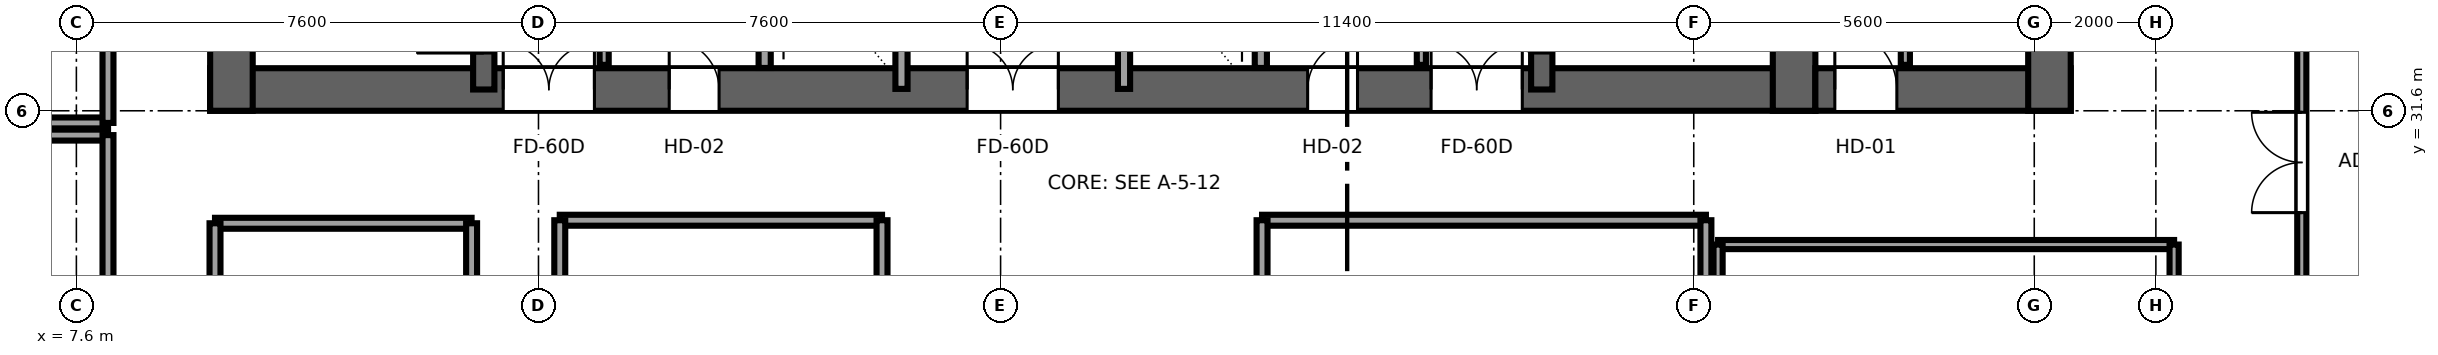
"""IFC4 building model, lengths in metres.
Left out: names, types, materials, properties, quantities, classifications, styles, units other than length and angle.
Written with IfcOpenShell. Run it as: python <this file> out.ifc"""

import sys

from ifc_helpers import new_model, si_unit, direction, frame, frame_2d, origin, place, context, subcontext, project, spatial, rectangle, extrude, source, transform, mapped, element, fill, save


model = new_model("IFC4")
c1 = context("Model", 3, precision=1e-05, world=origin(), true_north=direction((0.0, 1.0)))
c2 = subcontext(c1, "Body", "Model", "MODEL_VIEW")
j1 = project(units=[si_unit("LENGTHUNIT", "METRE"), si_unit("PLANEANGLEUNIT", "RADIAN")], contexts=[c1])
p1 = place(None, origin())
s1 = spatial("IfcSite", under=j1, at=p1, CompositionType="ELEMENT")
p2 = place(p1, origin())
s2 = spatial("IfcBuilding", under=s1, at=p2, CompositionType="ELEMENT")
p3 = place(p2, frame((0.0, 0.0, 168.35)))
s3 = spatial("IfcBuildingStorey", under=s2, at=p3, CompositionType="ELEMENT", Elevation=168.35)
p4 = place(p3, frame((9.8, 31.95, 0.0), z_axis=(0.0, 0.0, 1.0), x_axis=(1.0, 0.0, 0.0)))
e1 = element("IfcWall", 1, at=p4, inside=s3, PredefinedType="SHEAR", context=c2, shape_type="SweptSolid", body=[
    extrude(rectangle(XDim=26.4, YDim=0.7, at=frame_2d((13.2, 0.0))), origin(), (0.0, 0.0, 1.0), 3.55),
])
p5 = place(p4, frame((6.32, 0.0, 0.0), z_axis=(0.0, 0.0, 1.0), x_axis=(-1.0, 0.0, 0.0)))
e2 = element("IfcOpeningElement", 2, at=p5, cuts=e1, PredefinedType="OPENING", context=c2, shape_type="SweptSolid", body=[
    extrude(rectangle(XDim=1.5, YDim=2.04, at=frame_2d((0.75, 1.02))), frame((0.0, 0.36, 0.0), z_axis=(0.0, -1.0, 0.0), x_axis=(1.0, 0.0, 0.0)), (0.0, 0.0, 1.0), 0.72),
])
p6 = place(p4, frame((13.95, 0.0, 0.0), z_axis=(0.0, 0.0, 1.0), x_axis=(-1.0, 0.0, 0.0)))
e3 = element("IfcOpeningElement", 3, at=p6, cuts=e1, PredefinedType="OPENING", context=c2, shape_type="SweptSolid", body=[
    extrude(rectangle(XDim=1.5, YDim=2.04, at=frame_2d((0.75, 1.02))), frame((0.0, 0.36, 0.0), z_axis=(0.0, -1.0, 0.0), x_axis=(1.0, 0.0, 0.0)), (0.0, 0.0, 1.0), 0.72),
])
p7 = place(p4, frame((21.58, 0.0, 0.0), z_axis=(0.0, 0.0, 1.0), x_axis=(-1.0, 0.0, 0.0)))
e4 = element("IfcOpeningElement", 4, at=p7, cuts=e1, PredefinedType="OPENING", context=c2, shape_type="SweptSolid", body=[
    extrude(rectangle(XDim=1.5, YDim=2.04, at=frame_2d((0.75, 1.02))), frame((0.0, 0.36, 0.0), z_axis=(0.0, -1.0, 0.0), x_axis=(1.0, 0.0, 0.0)), (0.0, 0.0, 1.0), 0.72),
])
p8 = place(p4, frame((8.37, 0.0, 0.0), z_axis=(0.0, 0.0, 1.0), x_axis=(-1.0, 0.0, 0.0)))
e5 = element("IfcOpeningElement", 5, at=p8, cuts=e1, PredefinedType="OPENING", context=c2, shape_type="SweptSolid", body=[
    extrude(rectangle(XDim=0.82, YDim=2.01, at=frame_2d((0.41, 1.005))), frame((0.0, 0.36, 0.0), z_axis=(0.0, -1.0, 0.0), x_axis=(1.0, 0.0, 0.0)), (0.0, 0.0, 1.0), 0.72),
])
p9 = place(p4, frame((18.87, 0.0, 0.0), z_axis=(0.0, 0.0, 1.0), x_axis=(-1.0, 0.0, 0.0)))
e6 = element("IfcOpeningElement", 6, at=p9, cuts=e1, PredefinedType="OPENING", context=c2, shape_type="SweptSolid", body=[
    extrude(rectangle(XDim=0.82, YDim=2.01, at=frame_2d((0.41, 1.005))), frame((0.0, 0.36, 0.0), z_axis=(0.0, -1.0, 0.0), x_axis=(1.0, 0.0, 0.0)), (0.0, 0.0, 1.0), 0.72),
])
for number, where, z_axis, x_axis in (
    (7, (10.15, 31.6, 0.0), (0.0, 0.0, 1.0), (0.0, 1.0, 0.0)),
    (8, (35.85, 31.6, 0.0), (0.0, 0.0, 1.0), (0.0, 1.0, 0.0)),
):
    element("IfcWall", number, at=place(p3, frame(where, z_axis=z_axis, x_axis=x_axis)), inside=s3, PredefinedType="SHEAR", context=c2, shape_type="SweptSolid", body=[
        extrude(rectangle(XDim=13.6, YDim=0.7, at=frame_2d((6.8, 0.0))), origin(), (0.0, 0.0, 1.0), 3.55),
    ])
p10 = place(p3, frame((14.3, 31.95, 0.0), z_axis=(0.0, 0.0, 1.0), x_axis=(0.0, 1.0, 0.0)))
e9 = element("IfcWall", 9, at=p10, inside=s3, PredefinedType="SHEAR", context=c2, shape_type="SweptSolid", body=[
    extrude(rectangle(XDim=12.9, YDim=0.35, at=frame_2d((6.45, 0.0))), origin(), (0.0, 0.0, 1.0), 3.55),
])
p11 = place(p10, frame((0.6, 0.0, 0.0)))
e10 = element("IfcOpeningElement", 10, at=p11, cuts=e9, PredefinedType="OPENING", context=c2, shape_type="SweptSolid", body=[
    extrude(rectangle(XDim=1.1, YDim=2.12, at=frame_2d((0.55, 1.06))), frame((0.0, 0.185, 0.0), z_axis=(0.0, -1.0, 0.0), x_axis=(1.0, 0.0, 0.0)), (0.0, 0.0, 1.0), 0.37),
])
p12 = place(p3, frame((31.7, 31.95, 0.0), z_axis=(0.0, 0.0, 1.0), x_axis=(0.0, 1.0, 0.0)))
e11 = element("IfcWall", 11, at=p12, inside=s3, PredefinedType="SHEAR", context=c2, shape_type="SweptSolid", body=[
    extrude(rectangle(XDim=12.9, YDim=0.35, at=frame_2d((6.45, 0.0))), origin(), (0.0, 0.0, 1.0), 3.55),
])
p13 = place(p12, frame((1.7, 0.0, 0.0), z_axis=(0.0, 0.0, 1.0), x_axis=(-1.0, 0.0, 0.0)))
e12 = element("IfcOpeningElement", 12, at=p13, cuts=e11, PredefinedType="OPENING", context=c2, shape_type="SweptSolid", body=[
    extrude(rectangle(XDim=1.1, YDim=2.12, at=frame_2d((0.55, 1.06))), frame((0.0, 0.185, 0.0), z_axis=(0.0, -1.0, 0.0), x_axis=(1.0, 0.0, 0.0)), (0.0, 0.0, 1.0), 0.37),
])
p14 = place(p3, frame((36.2, 31.95, 0.0), z_axis=(0.0, 0.0, 1.0), x_axis=(1.0, 0.0, 0.0)))
e13 = element("IfcWall", 13, at=p14, inside=s3, PredefinedType="SHEAR", context=c2, shape_type="SweptSolid", body=[
    extrude(rectangle(XDim=4.2, YDim=0.7, at=frame_2d((2.1, 0.0))), origin(), (0.0, 0.0, 1.0), 3.55),
])
p15 = place(p14, frame((1.34, 0.0, 0.0), z_axis=(0.0, 0.0, 1.0), x_axis=(-1.0, 0.0, 0.0)))
e14 = element("IfcOpeningElement", 14, at=p15, cuts=e13, PredefinedType="OPENING", context=c2, shape_type="SweptSolid", body=[
    extrude(rectangle(XDim=1.02, YDim=2.03, at=frame_2d((0.51, 1.015))), frame((0.0, 0.36, 0.0), z_axis=(0.0, -1.0, 0.0), x_axis=(1.0, 0.0, 0.0)), (0.0, 0.0, 1.0), 0.72),
])
p16 = place(p3, frame((40.05, 31.6, 0.0), z_axis=(0.0, 0.0, 1.0), x_axis=(0.0, 1.0, 0.0)))
e15 = element("IfcWall", 15, at=p16, inside=s3, PredefinedType="SHEAR", context=c2, shape_type="SweptSolid", body=[
    extrude(rectangle(XDim=13.6, YDim=0.7, at=frame_2d((6.8, 0.0))), origin(), (0.0, 0.0, 1.0), 3.55),
])
for number, where, z_axis, x_axis in (
    (16, (18.92, 32.304, 0.0), (0.0, 0.0, 1.0), (0.0, 1.0, 0.0)),
    (17, (27.08, 32.304, 0.0), (0.0, 0.0, 1.0), (0.0, 1.0, 0.0)),
):
    element("IfcWall", number, at=place(p3, frame(where, z_axis=z_axis, x_axis=x_axis)), inside=s3, PredefinedType="SOLIDWALL", context=c2, shape_type="SweptSolid", body=[
        extrude(rectangle(XDim=3.846, YDim=0.2, at=frame_2d((1.923, 0.0))), origin(), (0.0, 0.0, 1.0), 3.37),
    ])
p17 = place(p3, frame((21.17, 31.96, 0.0), z_axis=(0.0, 0.0, 1.0), x_axis=(0.0, 1.0, 0.0)))
e18 = element("IfcWall", 18, at=p17, inside=s3, PredefinedType="SOLIDWALL", context=c2, shape_type="SweptSolid", body=[
    extrude(rectangle(XDim=12.58, YDim=0.2, at=frame_2d((6.29, 0.0))), origin(), (0.0, 0.0, 1.0), 3.37),
])
p18 = place(p17, frame((5.74, 0.0, 0.0)))
e19 = element("IfcOpeningElement", 19, at=p18, cuts=e18, PredefinedType="OPENING", context=c2, shape_type="SweptSolid", body=[
    extrude(rectangle(XDim=1.1, YDim=2.12, at=frame_2d((0.55, 1.06))), frame((0.0, 0.11, 0.0), z_axis=(0.0, -1.0, 0.0), x_axis=(1.0, 0.0, 0.0)), (0.0, 0.0, 1.0), 0.22),
])
p19 = place(p17, frame((8.24, 0.0, 0.0)))
e20 = element("IfcOpeningElement", 20, at=p19, cuts=e18, PredefinedType="OPENING", context=c2, shape_type="SweptSolid", body=[
    extrude(rectangle(XDim=1.1, YDim=2.12, at=frame_2d((0.55, 1.06))), frame((0.0, 0.11, 0.0), z_axis=(0.0, -1.0, 0.0), x_axis=(1.0, 0.0, 0.0)), (0.0, 0.0, 1.0), 0.22),
])
p20 = place(p3, frame((24.83, 31.96, 0.0), z_axis=(0.0, 0.0, 1.0), x_axis=(0.0, 1.0, 0.0)))
e21 = element("IfcWall", 21, at=p20, inside=s3, PredefinedType="SOLIDWALL", context=c2, shape_type="SweptSolid", body=[
    extrude(rectangle(XDim=12.58, YDim=0.2, at=frame_2d((6.29, 0.0))), origin(), (0.0, 0.0, 1.0), 3.37),
])
p21 = place(p20, frame((5.74, 0.0, 0.0)))
e22 = element("IfcOpeningElement", 22, at=p21, cuts=e21, PredefinedType="OPENING", context=c2, shape_type="SweptSolid", body=[
    extrude(rectangle(XDim=1.1, YDim=2.12, at=frame_2d((0.55, 1.06))), frame((0.0, 0.11, 0.0), z_axis=(0.0, -1.0, 0.0), x_axis=(1.0, 0.0, 0.0)), (0.0, 0.0, 1.0), 0.22),
])
p22 = place(p20, frame((8.24, 0.0, 0.0)))
e23 = element("IfcOpeningElement", 23, at=p22, cuts=e21, PredefinedType="OPENING", context=c2, shape_type="SweptSolid", body=[
    extrude(rectangle(XDim=1.1, YDim=2.12, at=frame_2d((0.55, 1.06))), frame((0.0, 0.11, 0.0), z_axis=(0.0, -1.0, 0.0), x_axis=(1.0, 0.0, 0.0)), (0.0, 0.0, 1.0), 0.22),
])
for number, where, z_axis, x_axis in (
    (24, (16.28, 32.355, 0.0), (0.0, 0.0, 1.0), (0.0, 1.0, 0.0)),
    (25, (29.72, 32.355, 0.0), (0.0, 0.0, 1.0), (0.0, 1.0, 0.0)),
):
    element("IfcWall", number, at=place(p3, frame(where, z_axis=z_axis, x_axis=x_axis)), inside=s3, PredefinedType="PARTITIONING", context=c2, shape_type="SweptSolid", body=[
        extrude(rectangle(XDim=0.865, YDim=0.15, at=frame_2d((0.433, 0.0))), origin(), (0.0, 0.0, 1.0), 3.37),
    ])
p23 = place(p3, frame((37.68, 32.355, 0.0), z_axis=(0.0, 0.0, 1.0), x_axis=(0.0, 1.0, 0.0)))
e26 = element("IfcWall", 26, at=p23, inside=s3, PredefinedType="PARTITIONING", context=c2, shape_type="SweptSolid", body=[
    extrude(rectangle(XDim=7.845, YDim=0.15, at=frame_2d((3.922, 0.0))), origin(), (0.0, 0.0, 1.0), 3.37),
])
p24 = place(p23, frame((3.413, 0.0, 0.0)))
e27 = element("IfcOpeningElement", 27, at=p24, cuts=e26, PredefinedType="OPENING", context=c2, shape_type="SweptSolid", body=[
    extrude(rectangle(XDim=1.02, YDim=2.03, at=frame_2d((0.51, 1.015))), frame((0.0, 0.085, 0.0), z_axis=(0.0, -1.0, 0.0), x_axis=(1.0, 0.0, 0.0)), (0.0, 0.0, 1.0), 0.17),
])
p25 = place(p3, frame((3.005, 31.2, 0.0), z_axis=(0.0, 0.0, 1.0), x_axis=(1.0, 0.0, 0.0)))
e28 = element("IfcWall", 28, at=p25, inside=s3, PredefinedType="PARTITIONING", context=c2, shape_type="SweptSolid", body=[
    extrude(rectangle(XDim=5.115, YDim=0.18, at=frame_2d((2.558, 0.0))), origin(), (0.0, 0.0, 1.0), 3.37),
])
p26 = place(p3, frame((8.12, 23.1, 0.0), z_axis=(0.0, 0.0, 1.0), x_axis=(0.0, 1.0, 0.0)))
e29 = element("IfcWall", 29, at=p26, inside=s3, PredefinedType="PARTITIONING", context=c2, shape_type="SweptSolid", body=[
    extrude(rectangle(XDim=8.1, YDim=0.18, at=frame_2d((4.05, 0.0))), origin(), (0.0, 0.0, 1.0), 3.37),
])
p27 = place(p26, frame((3.225, 0.0, 0.0)))
e30 = element("IfcOpeningElement", 30, at=p27, cuts=e29, PredefinedType="OPENING", context=c2, shape_type="SweptSolid", body=[
    extrude(rectangle(XDim=1.65, YDim=2.15, at=frame_2d((0.825, 1.075))), frame((0.0, 0.1, 0.0), z_axis=(0.0, -1.0, 0.0), x_axis=(1.0, 0.0, 0.0)), (0.0, 0.0, 1.0), 0.2),
])
p28 = place(p3, frame((3.005, 31.4, 0.0), z_axis=(0.0, 0.0, 1.0), x_axis=(1.0, 0.0, 0.0)))
e31 = element("IfcWall", 31, at=p28, inside=s3, PredefinedType="PARTITIONING", context=c2, shape_type="SweptSolid", body=[
    extrude(rectangle(XDim=5.115, YDim=0.18, at=frame_2d((2.558, 0.0))), origin(), (0.0, 0.0, 1.0), 3.37),
])
p29 = place(p3, frame((8.12, 31.4, 0.0), z_axis=(0.0, 0.0, 1.0), x_axis=(0.0, 1.0, 0.0)))
e32 = element("IfcWall", 32, at=p29, inside=s3, PredefinedType="PARTITIONING", context=c2, shape_type="SweptSolid", body=[
    extrude(rectangle(XDim=6.8, YDim=0.18, at=frame_2d((3.4, 0.0))), origin(), (0.0, 0.0, 1.0), 3.37),
])
p30 = place(p29, frame((3.175, 0.0, 0.0)))
e33 = element("IfcOpeningElement", 33, at=p30, cuts=e32, PredefinedType="OPENING", context=c2, shape_type="SweptSolid", body=[
    extrude(rectangle(XDim=1.65, YDim=2.15, at=frame_2d((0.825, 1.075))), frame((0.0, 0.1, 0.0), z_axis=(0.0, -1.0, 0.0), x_axis=(1.0, 0.0, 0.0)), (0.0, 0.0, 1.0), 0.2),
])
p31 = place(p3, frame((44.2, 26.9, 0.0), z_axis=(0.0, 0.0, 1.0), x_axis=(0.0, 1.0, 0.0)))
e34 = element("IfcWall", 34, at=p31, inside=s3, PredefinedType="PARTITIONING", context=c2, shape_type="SweptSolid", body=[
    extrude(rectangle(XDim=7.7, YDim=0.15, at=frame_2d((3.85, 0.0))), origin(), (0.0, 0.0, 1.0), 3.37),
])
p32 = place(p31, frame((3.025, 0.0, 0.0)))
e35 = element("IfcOpeningElement", 35, at=p32, cuts=e34, PredefinedType="OPENING", context=c2, shape_type="SweptSolid", body=[
    extrude(rectangle(XDim=1.65, YDim=2.15, at=frame_2d((0.825, 1.075))), frame((0.0, 0.085, 0.0), z_axis=(0.0, -1.0, 0.0), x_axis=(1.0, 0.0, 0.0)), (0.0, 0.0, 1.0), 0.17),
])
p33 = place(p3, frame((9.88, 29.75, 0.0), z_axis=(0.0, 0.0, 1.0), x_axis=(1.0, 0.0, 0.0)))
e36 = element("IfcWall", 36, at=p33, inside=s3, PredefinedType="PARTITIONING", context=c2, shape_type="SweptSolid", body=[
    extrude(rectangle(XDim=4.22, YDim=0.18, at=frame_2d((2.11, 0.0))), origin(), (0.0, 0.0, 1.0), 3.37),
])
for number, where, z_axis, x_axis in (
    (37, (9.88, 23.1, 0.0), (0.0, 0.0, 1.0), (0.0, 1.0, 0.0)),
    (38, (14.1, 23.1, 0.0), (0.0, 0.0, 1.0), (0.0, 1.0, 0.0)),
):
    element("IfcWall", number, at=place(p3, frame(where, z_axis=z_axis, x_axis=x_axis)), inside=s3, PredefinedType="PARTITIONING", context=c2, shape_type="SweptSolid", body=[
        extrude(rectangle(XDim=6.65, YDim=0.18, at=frame_2d((3.325, 0.0))), origin(), (0.0, 0.0, 1.0), 3.37),
    ])
p34 = place(p3, frame((27.1, 29.8, 0.0), z_axis=(0.0, 0.0, 1.0), x_axis=(1.0, 0.0, 0.0)))
e39 = element("IfcWall", 39, at=p34, inside=s3, PredefinedType="PARTITIONING", context=c2, shape_type="SweptSolid", body=[
    extrude(rectangle(XDim=7.3, YDim=0.18, at=frame_2d((3.65, 0.0))), origin(), (0.0, 0.0, 1.0), 3.37),
])
for number, where, z_axis, x_axis in (
    (40, (27.1, 23.1, 0.0), (0.0, 0.0, 1.0), (0.0, 1.0, 0.0)),
    (41, (34.4, 23.1, 0.0), (0.0, 0.0, 1.0), (0.0, 1.0, 0.0)),
):
    element("IfcWall", number, at=place(p3, frame(where, z_axis=z_axis, x_axis=x_axis)), inside=s3, PredefinedType="PARTITIONING", context=c2, shape_type="SweptSolid", body=[
        extrude(rectangle(XDim=6.7, YDim=0.18, at=frame_2d((3.35, 0.0))), origin(), (0.0, 0.0, 1.0), 3.37),
    ])
p35 = place(p3, frame((15.55, 29.8, 0.0), z_axis=(0.0, 0.0, 1.0), x_axis=(1.0, 0.0, 0.0)))
e42 = element("IfcWall", 42, at=p35, inside=s3, PredefinedType="PARTITIONING", context=c2, shape_type="SweptSolid", body=[
    extrude(rectangle(XDim=5.3, YDim=0.18, at=frame_2d((2.65, 0.0))), origin(), (0.0, 0.0, 1.0), 3.37),
])
for number, where, z_axis, x_axis in (
    (43, (15.55, 23.1, 0.0), (0.0, 0.0, 1.0), (0.0, 1.0, 0.0)),
    (44, (20.85, 23.1, 0.0), (0.0, 0.0, 1.0), (0.0, 1.0, 0.0)),
):
    element("IfcWall", number, at=place(p3, frame(where, z_axis=z_axis, x_axis=x_axis)), inside=s3, PredefinedType="PARTITIONING", context=c2, shape_type="SweptSolid", body=[
        extrude(rectangle(XDim=6.7, YDim=0.18, at=frame_2d((3.35, 0.0))), origin(), (0.0, 0.0, 1.0), 3.37),
    ])
p36 = place(p3, frame((34.6, 29.4, 0.0), z_axis=(0.0, 0.0, 1.0), x_axis=(1.0, 0.0, 0.0)))
e45 = element("IfcWall", 45, at=p36, inside=s3, PredefinedType="PARTITIONING", context=c2, shape_type="SweptSolid", body=[
    extrude(rectangle(XDim=7.5, YDim=0.15, at=frame_2d((3.75, 0.0))), origin(), (0.0, 0.0, 1.0), 3.37),
])
p37 = place(p3, frame((34.6, 23.1, 0.0), z_axis=(0.0, 0.0, 1.0), x_axis=(0.0, 1.0, 0.0)))
e46 = element("IfcWall", 46, at=p37, inside=s3, PredefinedType="PARTITIONING", context=c2, shape_type="SweptSolid", body=[
    extrude(rectangle(XDim=6.3, YDim=0.15, at=frame_2d((3.15, 0.0))), origin(), (0.0, 0.0, 1.0), 3.37),
])
p38 = place(p3, frame((42.1, 23.1, 0.0), z_axis=(0.0, 0.0, 1.0), x_axis=(0.0, 1.0, 0.0)))
e47 = element("IfcWall", 47, at=p38, inside=s3, PredefinedType="PARTITIONING", context=c2, shape_type="SweptSolid", body=[
    extrude(rectangle(XDim=6.3, YDim=0.15, at=frame_2d((3.15, 0.0))), origin(), (0.0, 0.0, 1.0), 2.16),
])
m1 = source(origin(), c2, "Body", "SweptSolid", [
    extrude(rectangle(XDim=1.1, YDim=2.12, at=frame_2d((0.55, 1.06))), frame((0.0, 0.025, 0.0), z_axis=(0.0, -1.0, 0.0), x_axis=(1.0, 0.0, 0.0)), (0.0, 0.0, 1.0), 0.05),
])
p39 = place(p11, origin())
e48 = element("IfcDoor", 48, at=p39, inside=s3, OperationType="SINGLE_SWING_LEFT", PredefinedType="DOOR", context=c2, shape_type="MappedRepresentation", body=[
    mapped(m1, transform((0.0, 0.0, 0.0), x_axis=(1.0, 0.0, 0.0), y_axis=(0.0, 1.0, 0.0), z_axis=(0.0, 0.0, 1.0), scale=1.0)),
])
fill(e10, e48)
p40 = place(p13, origin())
e49 = element("IfcDoor", 49, at=p40, inside=s3, OperationType="SINGLE_SWING_RIGHT", PredefinedType="DOOR", context=c2, shape_type="MappedRepresentation", body=[
    mapped(m1, transform((0.0, 0.0, 0.0), x_axis=(1.0, 0.0, 0.0), y_axis=(0.0, 1.0, 0.0), z_axis=(0.0, 0.0, 1.0), scale=1.0)),
])
fill(e12, e49)
m2 = source(origin(), c2, "Body", "SweptSolid", [
    extrude(rectangle(XDim=1.5, YDim=2.04, at=frame_2d((0.75, 1.02))), frame((0.0, 0.025, 0.0), z_axis=(0.0, -1.0, 0.0), x_axis=(1.0, 0.0, 0.0)), (0.0, 0.0, 1.0), 0.05),
])
p41 = place(p5, origin())
e50 = element("IfcDoor", 50, at=p41, inside=s3, OperationType="DOUBLE_DOOR_SINGLE_SWING", PredefinedType="DOOR", context=c2, shape_type="MappedRepresentation", body=[
    mapped(m2, transform((0.0, 0.0, 0.0), x_axis=(1.0, 0.0, 0.0), y_axis=(0.0, 1.0, 0.0), z_axis=(0.0, 0.0, 1.0), scale=1.0)),
])
fill(e2, e50)
p42 = place(p6, origin())
e51 = element("IfcDoor", 51, at=p42, inside=s3, OperationType="DOUBLE_DOOR_SINGLE_SWING", PredefinedType="DOOR", context=c2, shape_type="MappedRepresentation", body=[
    mapped(m2, transform((0.0, 0.0, 0.0), x_axis=(1.0, 0.0, 0.0), y_axis=(0.0, 1.0, 0.0), z_axis=(0.0, 0.0, 1.0), scale=1.0)),
])
fill(e3, e51)
p43 = place(p7, origin())
e52 = element("IfcDoor", 52, at=p43, inside=s3, OperationType="DOUBLE_DOOR_SINGLE_SWING", PredefinedType="DOOR", context=c2, shape_type="MappedRepresentation", body=[
    mapped(m2, transform((0.0, 0.0, 0.0), x_axis=(1.0, 0.0, 0.0), y_axis=(0.0, 1.0, 0.0), z_axis=(0.0, 0.0, 1.0), scale=1.0)),
])
fill(e4, e52)
m3 = source(origin(), c2, "Body", "SweptSolid", [
    extrude(rectangle(XDim=0.82, YDim=2.01, at=frame_2d((0.41, 1.005))), frame((0.0, 0.025, 0.0), z_axis=(0.0, -1.0, 0.0), x_axis=(1.0, 0.0, 0.0)), (0.0, 0.0, 1.0), 0.05),
])
p44 = place(p8, origin())
e53 = element("IfcDoor", 53, at=p44, inside=s3, OperationType="SINGLE_SWING_LEFT", PredefinedType="DOOR", context=c2, shape_type="MappedRepresentation", body=[
    mapped(m3, transform((0.0, 0.0, 0.0), x_axis=(1.0, 0.0, 0.0), y_axis=(0.0, 1.0, 0.0), z_axis=(0.0, 0.0, 1.0), scale=1.0)),
])
fill(e5, e53)
p45 = place(p9, origin())
e54 = element("IfcDoor", 54, at=p45, inside=s3, OperationType="SINGLE_SWING_RIGHT", PredefinedType="DOOR", context=c2, shape_type="MappedRepresentation", body=[
    mapped(m3, transform((0.0, 0.0, 0.0), x_axis=(1.0, 0.0, 0.0), y_axis=(0.0, 1.0, 0.0), z_axis=(0.0, 0.0, 1.0), scale=1.0)),
])
fill(e6, e54)
m4 = source(origin(), c2, "Body", "SweptSolid", [
    extrude(rectangle(XDim=1.02, YDim=2.03, at=frame_2d((0.51, 1.015))), frame((0.0, 0.025, 0.0), z_axis=(0.0, -1.0, 0.0), x_axis=(1.0, 0.0, 0.0)), (0.0, 0.0, 1.0), 0.05),
])
p46 = place(p15, origin())
e55 = element("IfcDoor", 55, at=p46, inside=s3, OperationType="SINGLE_SWING_LEFT", PredefinedType="DOOR", context=c2, shape_type="MappedRepresentation", body=[
    mapped(m4, transform((0.0, 0.0, 0.0), x_axis=(1.0, 0.0, 0.0), y_axis=(0.0, 1.0, 0.0), z_axis=(0.0, 0.0, 1.0), scale=1.0)),
])
fill(e14, e55)
m5 = source(origin(), c2, "Body", "SweptSolid", [
    extrude(rectangle(XDim=1.65, YDim=2.15, at=frame_2d((0.825, 1.075))), frame((0.0, 0.025, 0.0), z_axis=(0.0, -1.0, 0.0), x_axis=(1.0, 0.0, 0.0)), (0.0, 0.0, 1.0), 0.05),
])
p47 = place(p32, origin())
e56 = element("IfcDoor", 56, at=p47, inside=s3, OperationType="DOUBLE_DOOR_SINGLE_SWING", PredefinedType="DOOR", context=c2, shape_type="MappedRepresentation", body=[
    mapped(m5, transform((0.0, 0.0, 0.0), x_axis=(1.0, 0.0, 0.0), y_axis=(0.0, 1.0, 0.0), z_axis=(0.0, 0.0, 1.0), scale=1.0)),
])
fill(e35, e56)
save(model, sys.argv[1])
